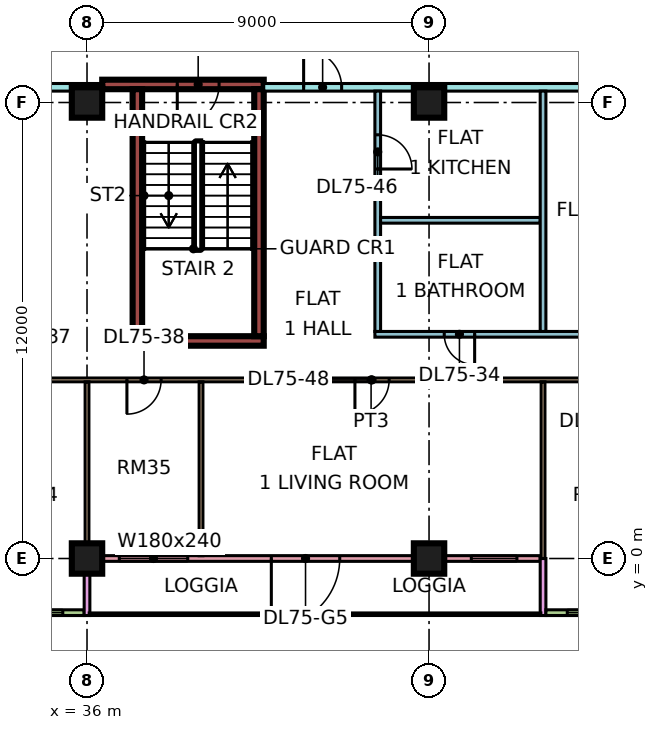
"""IFC4 building model, lengths in metres.
Left out: names, types, materials, properties, quantities, classifications, styles, units other than length and angle.
Written with IfcOpenShell. Run it as: python <this file> out.ifc"""

import sys

from ifc_helpers import new_model, si_unit, direction, frame, frame_2d, origin, origin_2d, place, context, subcontext, project, spatial, rectangle, extrude, element, fill, save


model = new_model("IFC4")
c1 = context("Model", 3, precision=1e-05, world=origin(), true_north=direction((0.0, 1.0)))
c2 = subcontext(c1, "Body", "Model", "MODEL_VIEW")
j1 = project(units=[si_unit("LENGTHUNIT", "METRE"), si_unit("PLANEANGLEUNIT", "RADIAN")], contexts=[c1])
p1 = place(None, origin())
s1 = spatial("IfcSite", under=j1, at=p1, CompositionType="ELEMENT")
p2 = place(p1, origin())
s2 = spatial("IfcBuilding", under=s1, at=p2, CompositionType="ELEMENT")
p3 = place(p2, frame((0.0, 0.0, 318.4)))
s3 = spatial("IfcBuildingStorey", under=s2, at=p3, CompositionType="ELEMENT", Elevation=318.4)
for number, where, z_axis, x_axis in (
    (1, (36.0, 0.0, 0.0), (0.0, 0.0, 1.0), (1.0, 0.0, 0.0)),
    (2, (36.0, 12.0, 0.0), (0.0, 0.0, 1.0), (1.0, 0.0, 0.0)),
    (3, (45.0, 0.0, 0.0), (0.0, 0.0, 1.0), (1.0, 0.0, 0.0)),
    (4, (45.0, 12.0, 0.0), (0.0, 0.0, 1.0), (1.0, 0.0, 0.0)),
):
    element("IfcColumn", number, at=place(p3, frame(where, z_axis=z_axis, x_axis=x_axis)), inside=s3, PredefinedType="COLUMN", context=c2, shape_type="SweptSolid", body=[
        extrude(rectangle(XDim=0.8, YDim=0.8, at=origin_2d()), origin(), (0.0, 0.0, 1.0), 3.75),
    ])
p4 = place(p3, frame((37.2, 5.725, 0.0), z_axis=(0.0, 0.0, 1.0), x_axis=(1.0, 0.0, 0.0)))
e5 = element("IfcWall", 5, at=p4, inside=s3, PredefinedType="SHEAR", context=c2, shape_type="SweptSolid", body=[
    extrude(rectangle(XDim=3.45, YDim=0.25, at=frame_2d((1.725, 0.0))), origin(), (0.0, 0.0, 1.0), 3.75),
])
p5 = place(p3, frame((36.4, 12.475, 0.0), z_axis=(0.0, 0.0, 1.0), x_axis=(1.0, 0.0, 0.0)))
e6 = element("IfcWall", 6, at=p5, inside=s3, PredefinedType="SHEAR", context=c2, shape_type="SweptSolid", body=[
    extrude(rectangle(XDim=4.25, YDim=0.25, at=frame_2d((2.125, 0.0))), origin(), (0.0, 0.0, 1.0), 3.75),
])
p6 = place(p5, frame((1.975, 0.0, 0.0)))
e7 = element("IfcOpeningElement", 7, at=p6, cuts=e6, PredefinedType="OPENING", context=c2, shape_type="SweptSolid", body=[
    extrude(rectangle(XDim=1.1, YDim=2.2, at=frame_2d((0.55, 1.1))), frame((0.0, 0.135, 0.0), z_axis=(0.0, -1.0, 0.0), x_axis=(1.0, 0.0, 0.0)), (0.0, 0.0, 1.0), 0.27),
])
for number, where, z_axis, x_axis in (
    (8, (37.325, 5.85, 0.0), (0.0, 0.0, 1.0), (0.0, 1.0, 0.0)),
    (9, (40.525, 5.85, 0.0), (0.0, 0.0, 1.0), (0.0, 1.0, 0.0)),
):
    element("IfcWall", number, at=place(p3, frame(where, z_axis=z_axis, x_axis=x_axis)), inside=s3, PredefinedType="SHEAR", context=c2, shape_type="SweptSolid", body=[
        extrude(rectangle(XDim=6.5, YDim=0.25, at=frame_2d((3.25, 0.0))), origin(), (0.0, 0.0, 1.0), 3.75),
    ])
p7 = place(p3, frame((24.075, -1.425, 0.0), z_axis=(0.0, 0.0, 1.0), x_axis=(1.0, 0.0, 0.0)))
e10 = element("IfcWall", 10, at=p7, inside=s3, PredefinedType="SOLIDWALL", context=c2, shape_type="SweptSolid", body=[
    extrude(rectangle(XDim=11.85, YDim=0.15, at=frame_2d((5.925, 0.0))), origin(), (0.0, 0.0, 1.0), 3.3),
])
p8 = place(p7, frame((2.962, 0.0, 0.45)))
e11 = element("IfcOpeningElement", 11, at=p8, cuts=e10, PredefinedType="OPENING", context=c2, shape_type="SweptSolid", body=[
    extrude(rectangle(XDim=3.0, YDim=2.4, at=frame_2d((1.5, 1.2))), frame((0.0, 0.085, 0.0), z_axis=(0.0, -1.0, 0.0), x_axis=(1.0, 0.0, 0.0)), (0.0, 0.0, 1.0), 0.17),
])
p9 = place(p7, frame((9.488, 0.0, 0.45)))
e12 = element("IfcOpeningElement", 12, at=p9, cuts=e10, PredefinedType="OPENING", context=c2, shape_type="SweptSolid", body=[
    extrude(rectangle(XDim=1.8, YDim=2.4, at=frame_2d((0.9, 1.2))), frame((0.0, 0.085, 0.0), z_axis=(0.0, -1.0, 0.0), x_axis=(1.0, 0.0, 0.0)), (0.0, 0.0, 1.0), 0.17),
])
p10 = place(p3, frame((36.075, 0.0, 0.0), z_axis=(0.0, 0.0, 1.0), x_axis=(1.0, 0.0, 0.0)))
e13 = element("IfcWall", 13, at=p10, inside=s3, PredefinedType="SOLIDWALL", context=c2, shape_type="SweptSolid", body=[
    extrude(rectangle(XDim=11.85, YDim=0.15, at=frame_2d((5.925, 0.0))), origin(), (0.0, 0.0, 1.0), 3.3),
])
p11 = place(p10, frame((0.775, 0.0, 0.45)))
e14 = element("IfcOpeningElement", 14, at=p11, cuts=e13, PredefinedType="OPENING", context=c2, shape_type="SweptSolid", body=[
    extrude(rectangle(XDim=1.8, YDim=2.4, at=frame_2d((0.9, 1.2))), frame((0.0, 0.085, 0.0), z_axis=(0.0, -1.0, 0.0), x_axis=(1.0, 0.0, 0.0)), (0.0, 0.0, 1.0), 0.17),
])
p12 = place(p10, frame((4.775, 0.0, 0.0)))
e15 = element("IfcOpeningElement", 15, at=p12, cuts=e13, PredefinedType="OPENING", context=c2, shape_type="SweptSolid", body=[
    extrude(rectangle(XDim=1.8, YDim=2.4, at=frame_2d((0.9, 1.2))), frame((0.0, 0.085, 0.0), z_axis=(0.0, -1.0, 0.0), x_axis=(1.0, 0.0, 0.0)), (0.0, 0.0, 1.0), 0.17),
])
p13 = place(p10, frame((10.038, 0.0, 0.45)))
e16 = element("IfcOpeningElement", 16, at=p13, cuts=e13, PredefinedType="OPENING", context=c2, shape_type="SweptSolid", body=[
    extrude(rectangle(XDim=1.2, YDim=2.4, at=frame_2d((0.6, 1.2))), frame((0.0, 0.085, 0.0), z_axis=(0.0, -1.0, 0.0), x_axis=(1.0, 0.0, 0.0)), (0.0, 0.0, 1.0), 0.17),
])
for number, where, z_axis, x_axis in (
    (17, (36.0, -1.5, 0.0), (0.0, 0.0, 1.0), (0.0, 1.0, 0.0)),
    (18, (48.0, -1.5, 0.0), (0.0, 0.0, 1.0), (0.0, 1.0, 0.0)),
):
    element("IfcWall", number, at=place(p3, frame(where, z_axis=z_axis, x_axis=x_axis)), inside=s3, PredefinedType="SOLIDWALL", context=c2, shape_type="SweptSolid", body=[
        extrude(rectangle(XDim=1.5, YDim=0.15, at=frame_2d((0.75, 0.0))), origin(), (0.0, 0.0, 1.0), 3.3),
    ])
p14 = place(p3, frame((48.075, -1.425, 0.0), z_axis=(0.0, 0.0, 1.0), x_axis=(1.0, 0.0, 0.0)))
e19 = element("IfcWall", 19, at=p14, inside=s3, PredefinedType="SOLIDWALL", context=c2, shape_type="SweptSolid", body=[
    extrude(rectangle(XDim=13.425, YDim=0.15, at=frame_2d((6.712, 0.0))), origin(), (0.0, 0.0, 1.0), 3.3),
])
p15 = place(p14, frame((0.562, 0.0, 0.45)))
e20 = element("IfcOpeningElement", 20, at=p15, cuts=e19, PredefinedType="OPENING", context=c2, shape_type="SweptSolid", body=[
    extrude(rectangle(XDim=1.8, YDim=2.4, at=frame_2d((0.9, 1.2))), frame((0.0, 0.085, 0.0), z_axis=(0.0, -1.0, 0.0), x_axis=(1.0, 0.0, 0.0)), (0.0, 0.0, 1.0), 0.17),
])
p16 = place(p14, frame((3.525, 0.0, 0.45)))
e21 = element("IfcOpeningElement", 21, at=p16, cuts=e19, PredefinedType="OPENING", context=c2, shape_type="SweptSolid", body=[
    extrude(rectangle(XDim=1.8, YDim=2.4, at=frame_2d((0.9, 1.2))), frame((0.0, 0.085, 0.0), z_axis=(0.0, -1.0, 0.0), x_axis=(1.0, 0.0, 0.0)), (0.0, 0.0, 1.0), 0.17),
])
p17 = place(p14, frame((7.425, 0.0, 0.45)))
e22 = element("IfcOpeningElement", 22, at=p17, cuts=e19, PredefinedType="OPENING", context=c2, shape_type="SweptSolid", body=[
    extrude(rectangle(XDim=3.0, YDim=2.4, at=frame_2d((1.5, 1.2))), frame((0.0, 0.085, 0.0), z_axis=(0.0, -1.0, 0.0), x_axis=(1.0, 0.0, 0.0)), (0.0, 0.0, 1.0), 0.17),
])
p18 = place(p14, frame((12.225, 0.0, 0.45)))
e23 = element("IfcOpeningElement", 23, at=p18, cuts=e19, PredefinedType="OPENING", context=c2, shape_type="SweptSolid", body=[
    extrude(rectangle(XDim=0.9, YDim=2.4, at=frame_2d((0.45, 1.2))), frame((0.0, 0.085, 0.0), z_axis=(0.0, -1.0, 0.0), x_axis=(1.0, 0.0, 0.0)), (0.0, 0.0, 1.0), 0.17),
])
p19 = place(p3, frame((33.05, 4.7, 0.0), z_axis=(0.0, 0.0, 1.0), x_axis=(1.0, 0.0, 0.0)))
e24 = element("IfcWall", 24, at=p19, inside=s3, PredefinedType="PARTITIONING", context=c2, shape_type="SweptSolid", body=[
    extrude(rectangle(XDim=20.85, YDim=0.1, at=frame_2d((10.425, 0.0))), origin(), (0.0, 0.0, 1.0), 3.3),
])
p20 = place(p19, frame((1.0, 0.0, 0.0)))
e25 = element("IfcOpeningElement", 25, at=p20, cuts=e24, PredefinedType="OPENING", context=c2, shape_type="SweptSolid", body=[
    extrude(rectangle(XDim=0.9, YDim=2.1, at=frame_2d((0.45, 1.05))), frame((0.0, 0.06, 0.0), z_axis=(0.0, -1.0, 0.0), x_axis=(1.0, 0.0, 0.0)), (0.0, 0.0, 1.0), 0.12),
])
p21 = place(p19, frame((4.0, 0.0, 0.0)))
e26 = element("IfcOpeningElement", 26, at=p21, cuts=e24, PredefinedType="OPENING", context=c2, shape_type="SweptSolid", body=[
    extrude(rectangle(XDim=0.9, YDim=2.1, at=frame_2d((0.45, 1.05))), frame((0.0, 0.06, 0.0), z_axis=(0.0, -1.0, 0.0), x_axis=(1.0, 0.0, 0.0)), (0.0, 0.0, 1.0), 0.12),
])
p22 = place(p19, frame((16.0, 0.0, 0.0)))
e27 = element("IfcOpeningElement", 27, at=p22, cuts=e24, PredefinedType="OPENING", context=c2, shape_type="SweptSolid", body=[
    extrude(rectangle(XDim=0.9, YDim=2.1, at=frame_2d((0.45, 1.05))), frame((0.0, 0.06, 0.0), z_axis=(0.0, -1.0, 0.0), x_axis=(1.0, 0.0, 0.0)), (0.0, 0.0, 1.0), 0.12),
])
p23 = place(p19, frame((19.0, 0.0, 0.0)))
e28 = element("IfcOpeningElement", 28, at=p23, cuts=e24, PredefinedType="OPENING", context=c2, shape_type="SweptSolid", body=[
    extrude(rectangle(XDim=0.9, YDim=2.1, at=frame_2d((0.45, 1.05))), frame((0.0, 0.06, 0.0), z_axis=(0.0, -1.0, 0.0), x_axis=(1.0, 0.0, 0.0)), (0.0, 0.0, 1.0), 0.12),
])
p24 = place(p19, frame((10.0, 0.0, 0.0)))
e29 = element("IfcOpeningElement", 29, at=p24, cuts=e24, PredefinedType="OPENING", context=c2, shape_type="SweptSolid", body=[
    extrude(rectangle(XDim=0.9, YDim=2.1, at=frame_2d((0.45, 1.05))), frame((0.0, 0.06, 0.0), z_axis=(0.0, -1.0, 0.0), x_axis=(1.0, 0.0, 0.0)), (0.0, 0.0, 1.0), 0.12),
])
p25 = place(p3, frame((34.0, 12.4, 0.0), z_axis=(0.0, 0.0, 1.0), x_axis=(1.0, 0.0, 0.0)))
e30 = element("IfcWall", 30, at=p25, inside=s3, PredefinedType="PARTITIONING", context=c2, shape_type="SweptSolid", body=[
    extrude(rectangle(XDim=2.401, YDim=0.2, at=frame_2d((1.2, 0.0))), origin(), (0.0, 0.0, 1.0), 3.3),
])
p26 = place(p3, frame((36.0, 0.0, 0.0), z_axis=(0.0, 0.0, 1.0), x_axis=(0.0, 1.0, 0.0)))
e31 = element("IfcWall", 31, at=p26, inside=s3, PredefinedType="PARTITIONING", context=c2, shape_type="SweptSolid", body=[
    extrude(rectangle(XDim=4.65, YDim=0.1, at=frame_2d((2.325, 0.0))), origin(), (0.0, 0.0, 1.0), 3.3),
])
p27 = place(p3, frame((39.0, 0.074, 0.0), z_axis=(0.0, 0.0, 1.0), x_axis=(0.0, 1.0, 0.0)))
e32 = element("IfcWall", 32, at=p27, inside=s3, PredefinedType="PARTITIONING", context=c2, shape_type="SweptSolid", body=[
    extrude(rectangle(XDim=4.576, YDim=0.1, at=frame_2d((2.288, 0.0))), origin(), (0.0, 0.0, 1.0), 3.3),
])
p28 = place(p3, frame((40.65, 12.4, 0.0), z_axis=(0.0, 0.0, 1.0), x_axis=(1.0, 0.0, 0.0)))
e33 = element("IfcWall", 33, at=p28, inside=s3, PredefinedType="PARTITIONING", context=c2, shape_type="SweptSolid", body=[
    extrude(rectangle(XDim=22.276, YDim=0.2, at=frame_2d((11.138, 0.0))), origin(), (0.0, 0.0, 1.0), 3.3),
])
p29 = place(p28, frame((20.4, 0.0, 0.0)))
e34 = element("IfcOpeningElement", 34, at=p29, cuts=e33, PredefinedType="OPENING", context=c2, shape_type="SweptSolid", body=[
    extrude(rectangle(XDim=1.0, YDim=2.1, at=frame_2d((0.5, 1.05))), frame((0.0, 0.11, 0.0), z_axis=(0.0, -1.0, 0.0), x_axis=(1.0, 0.0, 0.0)), (0.0, 0.0, 1.0), 0.22),
])
p30 = place(p28, frame((1.05, 0.0, 0.0)))
e35 = element("IfcOpeningElement", 35, at=p30, cuts=e33, PredefinedType="OPENING", context=c2, shape_type="SweptSolid", body=[
    extrude(rectangle(XDim=1.0, YDim=2.1, at=frame_2d((0.5, 1.05))), frame((0.0, 0.11, 0.0), z_axis=(0.0, -1.0, 0.0), x_axis=(1.0, 0.0, 0.0)), (0.0, 0.0, 1.0), 0.22),
])
p31 = place(p3, frame((43.575, 5.9, 0.0), z_axis=(0.0, 0.0, 1.0), x_axis=(1.0, 0.0, 0.0)))
e36 = element("IfcWall", 36, at=p31, inside=s3, PredefinedType="PARTITIONING", context=c2, shape_type="SweptSolid", body=[
    extrude(rectangle(XDim=10.325, YDim=0.15, at=frame_2d((5.163, 0.0))), origin(), (0.0, 0.0, 1.0), 3.3),
])
p32 = place(p31, frame((1.825, 0.0, 0.0)))
e37 = element("IfcOpeningElement", 37, at=p32, cuts=e36, PredefinedType="OPENING", context=c2, shape_type="SweptSolid", body=[
    extrude(rectangle(XDim=0.8, YDim=2.1, at=frame_2d((0.4, 1.05))), frame((0.0, 0.085, 0.0), z_axis=(0.0, -1.0, 0.0), x_axis=(1.0, 0.0, 0.0)), (0.0, 0.0, 1.0), 0.17),
])
p33 = place(p31, frame((6.975, 0.0, 0.0)))
e38 = element("IfcOpeningElement", 38, at=p33, cuts=e36, PredefinedType="OPENING", context=c2, shape_type="SweptSolid", body=[
    extrude(rectangle(XDim=0.9, YDim=2.1, at=frame_2d((0.45, 1.05))), frame((0.0, 0.085, 0.0), z_axis=(0.0, -1.0, 0.0), x_axis=(1.0, 0.0, 0.0)), (0.0, 0.0, 1.0), 0.17),
])
p34 = place(p3, frame((43.65, 5.975, 0.0), z_axis=(0.0, 0.0, 1.0), x_axis=(0.0, 1.0, 0.0)))
e39 = element("IfcWall", 39, at=p34, inside=s3, PredefinedType="PARTITIONING", context=c2, shape_type="SweptSolid", body=[
    extrude(rectangle(XDim=6.325, YDim=0.15, at=frame_2d((3.163, 0.0))), origin(), (0.0, 0.0, 1.0), 3.3),
])
p35 = place(p34, frame((4.275, 0.0, 0.0)))
e40 = element("IfcOpeningElement", 40, at=p35, cuts=e39, PredefinedType="OPENING", context=c2, shape_type="SweptSolid", body=[
    extrude(rectangle(XDim=0.9, YDim=2.1, at=frame_2d((0.45, 1.05))), frame((0.0, 0.085, 0.0), z_axis=(0.0, -1.0, 0.0), x_axis=(1.0, 0.0, 0.0)), (0.0, 0.0, 1.0), 0.17),
])
p36 = place(p3, frame((43.725, 8.9, 0.0), z_axis=(0.0, 0.0, 1.0), x_axis=(1.0, 0.0, 0.0)))
e41 = element("IfcWall", 41, at=p36, inside=s3, PredefinedType="PARTITIONING", context=c2, shape_type="SweptSolid", body=[
    extrude(rectangle(XDim=4.2, YDim=0.15, at=frame_2d((2.1, 0.0))), origin(), (0.0, 0.0, 1.0), 3.3),
])
p37 = place(p3, frame((48.0, 0.0, 0.0), z_axis=(0.0, 0.0, 1.0), x_axis=(0.0, 1.0, 0.0)))
e42 = element("IfcWall", 42, at=p37, inside=s3, PredefinedType="PARTITIONING", context=c2, shape_type="SweptSolid", body=[
    extrude(rectangle(XDim=4.65, YDim=0.1, at=frame_2d((2.325, 0.0))), origin(), (0.0, 0.0, 1.0), 3.3),
])
p38 = place(p3, frame((48.0, 5.975, 0.0), z_axis=(0.0, 0.0, 1.0), x_axis=(0.0, 1.0, 0.0)))
e43 = element("IfcWall", 43, at=p38, inside=s3, PredefinedType="PARTITIONING", context=c2, shape_type="SweptSolid", body=[
    extrude(rectangle(XDim=6.325, YDim=0.15, at=frame_2d((3.163, 0.0))), origin(), (0.0, 0.0, 1.0), 3.3),
])
p39 = place(p9, origin())
e44 = element("IfcWindow", 44, at=p39, inside=s3, PartitioningType="SINGLE_PANEL", PredefinedType="WINDOW", context=c2, shape_type="SweptSolid", body=[
    extrude(rectangle(XDim=1.8, YDim=2.4, at=frame_2d((0.9, 1.2))), frame((0.0, 0.03, 0.0), z_axis=(0.0, -1.0, 0.0), x_axis=(1.0, 0.0, 0.0)), (0.0, 0.0, 1.0), 0.06),
])
fill(e12, e44)
p40 = place(p11, origin())
e45 = element("IfcWindow", 45, at=p40, inside=s3, PartitioningType="SINGLE_PANEL", PredefinedType="WINDOW", context=c2, shape_type="SweptSolid", body=[
    extrude(rectangle(XDim=1.8, YDim=2.4, at=frame_2d((0.9, 1.2))), frame((0.0, 0.03, 0.0), z_axis=(0.0, -1.0, 0.0), x_axis=(1.0, 0.0, 0.0)), (0.0, 0.0, 1.0), 0.06),
])
fill(e14, e45)
p41 = place(p12, frame((1.8, 0.0, 0.0), z_axis=(0.0, 0.0, 1.0), x_axis=(-1.0, 0.0, 0.0)))
e46 = element("IfcDoor", 46, at=p41, inside=s3, OperationType="DOUBLE_DOOR_SINGLE_SWING", PredefinedType="DOOR", context=c2, shape_type="SweptSolid", body=[
    extrude(rectangle(XDim=1.8, YDim=2.4, at=frame_2d((0.9, 1.2))), frame((0.0, 0.025, 0.0), z_axis=(0.0, -1.0, 0.0), x_axis=(1.0, 0.0, 0.0)), (0.0, 0.0, 1.0), 0.05),
])
fill(e15, e46)
p42 = place(p13, origin())
e47 = element("IfcWindow", 47, at=p42, inside=s3, PartitioningType="SINGLE_PANEL", PredefinedType="WINDOW", context=c2, shape_type="SweptSolid", body=[
    extrude(rectangle(XDim=1.2, YDim=2.4, at=frame_2d((0.6, 1.2))), frame((0.0, 0.03, 0.0), z_axis=(0.0, -1.0, 0.0), x_axis=(1.0, 0.0, 0.0)), (0.0, 0.0, 1.0), 0.06),
])
fill(e16, e47)
p43 = place(p15, origin())
e48 = element("IfcWindow", 48, at=p43, inside=s3, PartitioningType="SINGLE_PANEL", PredefinedType="WINDOW", context=c2, shape_type="SweptSolid", body=[
    extrude(rectangle(XDim=1.8, YDim=2.4, at=frame_2d((0.9, 1.2))), frame((0.0, 0.03, 0.0), z_axis=(0.0, -1.0, 0.0), x_axis=(1.0, 0.0, 0.0)), (0.0, 0.0, 1.0), 0.06),
])
fill(e20, e48)
p44 = place(p6, frame((1.1, 0.0, 0.0), z_axis=(0.0, 0.0, 1.0), x_axis=(-1.0, 0.0, 0.0)))
e49 = element("IfcDoor", 49, at=p44, inside=s3, OperationType="SINGLE_SWING_LEFT", PredefinedType="DOOR", context=c2, shape_type="SweptSolid", body=[
    extrude(rectangle(XDim=1.1, YDim=2.2, at=frame_2d((0.55, 1.1))), frame((0.0, 0.025, 0.0), z_axis=(0.0, -1.0, 0.0), x_axis=(1.0, 0.0, 0.0)), (0.0, 0.0, 1.0), 0.05),
])
fill(e7, e49)
p45 = place(p32, origin())
e50 = element("IfcDoor", 50, at=p45, inside=s3, OperationType="SINGLE_SWING_RIGHT", PredefinedType="DOOR", context=c2, shape_type="SweptSolid", body=[
    extrude(rectangle(XDim=0.8, YDim=2.1, at=frame_2d((0.4, 1.05))), frame((0.0, 0.025, 0.0), z_axis=(0.0, -1.0, 0.0), x_axis=(1.0, 0.0, 0.0)), (0.0, 0.0, 1.0), 0.05),
])
fill(e37, e50)
p46 = place(p21, frame((0.9, 0.0, 0.0), z_axis=(0.0, 0.0, 1.0), x_axis=(-1.0, 0.0, 0.0)))
e51 = element("IfcDoor", 51, at=p46, inside=s3, OperationType="SINGLE_SWING_LEFT", PredefinedType="DOOR", context=c2, shape_type="SweptSolid", body=[
    extrude(rectangle(XDim=0.9, YDim=2.1, at=frame_2d((0.45, 1.05))), frame((0.0, 0.025, 0.0), z_axis=(0.0, -1.0, 0.0), x_axis=(1.0, 0.0, 0.0)), (0.0, 0.0, 1.0), 0.05),
])
fill(e26, e51)
p47 = place(p30, origin())
e52 = element("IfcDoor", 52, at=p47, inside=s3, OperationType="SINGLE_SWING_LEFT", PredefinedType="DOOR", context=c2, shape_type="SweptSolid", body=[
    extrude(rectangle(XDim=1.0, YDim=2.1, at=frame_2d((0.5, 1.05))), frame((0.0, 0.025, 0.0), z_axis=(0.0, -1.0, 0.0), x_axis=(1.0, 0.0, 0.0)), (0.0, 0.0, 1.0), 0.05),
])
fill(e35, e52)
p48 = place(p35, frame((0.9, 0.0, 0.0), z_axis=(0.0, 0.0, 1.0), x_axis=(-1.0, 0.0, 0.0)))
e53 = element("IfcDoor", 53, at=p48, inside=s3, OperationType="SINGLE_SWING_LEFT", PredefinedType="DOOR", context=c2, shape_type="SweptSolid", body=[
    extrude(rectangle(XDim=0.9, YDim=2.1, at=frame_2d((0.45, 1.05))), frame((0.0, 0.025, 0.0), z_axis=(0.0, -1.0, 0.0), x_axis=(1.0, 0.0, 0.0)), (0.0, 0.0, 1.0), 0.05),
])
fill(e40, e53)
p49 = place(p24, frame((0.9, 0.0, 0.0), z_axis=(0.0, 0.0, 1.0), x_axis=(-1.0, 0.0, 0.0)))
e54 = element("IfcDoor", 54, at=p49, inside=s3, OperationType="SINGLE_SWING_LEFT", PredefinedType="DOOR", context=c2, shape_type="SweptSolid", body=[
    extrude(rectangle(XDim=0.9, YDim=2.1, at=frame_2d((0.45, 1.05))), frame((0.0, 0.025, 0.0), z_axis=(0.0, -1.0, 0.0), x_axis=(1.0, 0.0, 0.0)), (0.0, 0.0, 1.0), 0.05),
])
fill(e29, e54)
save(model, sys.argv[1])
